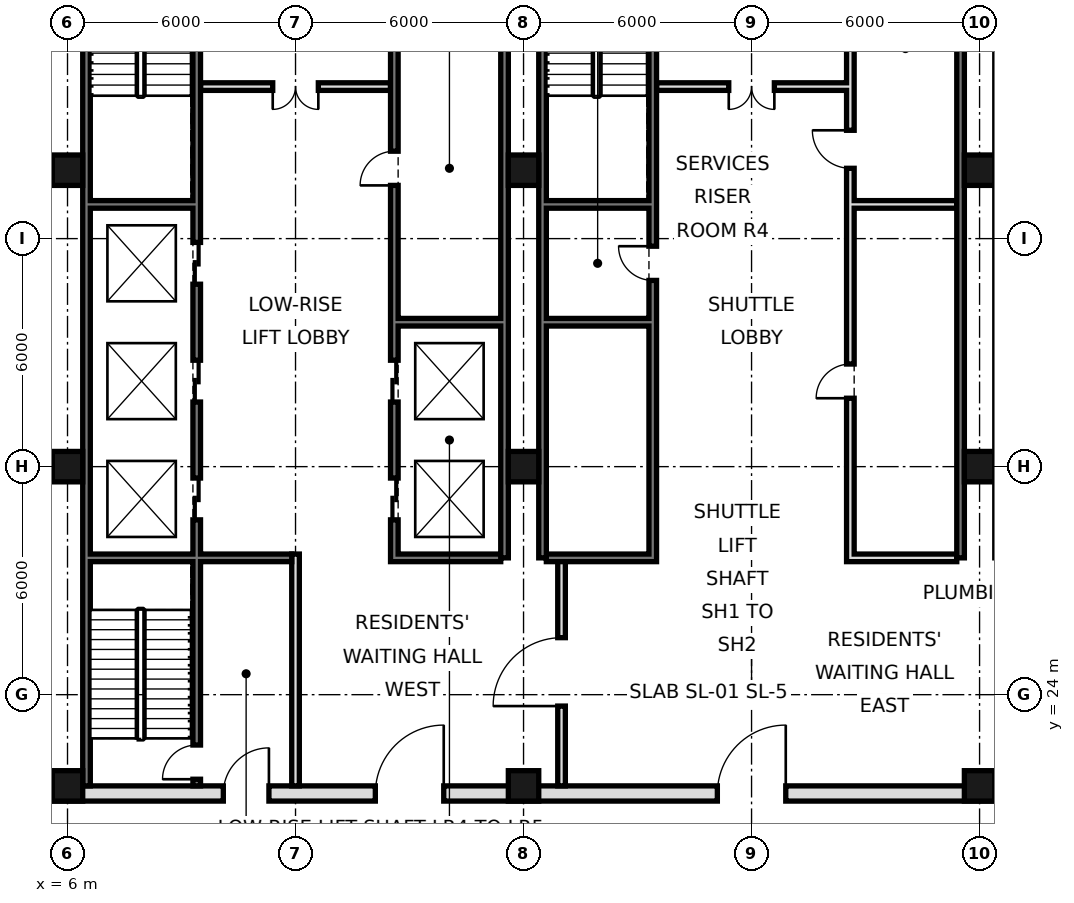
"""IFC4 building model, lengths in metres.
Left out: names, types, materials, properties, quantities, classifications, styles, units other than length and angle.
Written with IfcOpenShell. Run it as: python <this file> out.ifc"""

import sys

from ifc_helpers import new_model, si_unit, direction, frame, frame_2d, origin, origin_2d, place, context, subcontext, project, spatial, rectangle, hollow_rectangle, extrude, element, fill, save


model = new_model("IFC4")
c1 = context("Model", 3, precision=1e-05, world=origin(), true_north=direction((0.0, 1.0)))
c2 = subcontext(c1, "Body", "Model", "MODEL_VIEW")
j1 = project(units=[si_unit("LENGTHUNIT", "METRE"), si_unit("PLANEANGLEUNIT", "RADIAN")], contexts=[c1])
p1 = place(None, origin())
s1 = spatial("IfcSite", under=j1, at=p1, CompositionType="ELEMENT")
p2 = place(p1, origin())
s2 = spatial("IfcBuilding", under=s1, at=p2, CompositionType="ELEMENT")
p3 = place(p2, frame((0.0, 0.0, 34.8)))
s3 = spatial("IfcBuildingStorey", under=s2, at=p3, CompositionType="ELEMENT", Elevation=34.8)
for number, where, z_axis, x_axis in (
    (1, (6.0, 21.6, 0.0), (0.0, 0.0, 1.0), (1.0, 0.0, 0.0)),
    (2, (6.0, 30.0, 0.0), (0.0, 0.0, 1.0), (1.0, 0.0, 0.0)),
    (3, (6.0, 37.8, 0.0), (0.0, 0.0, 1.0), (1.0, 0.0, 0.0)),
    (4, (18.0, 21.6, 0.0), (0.0, 0.0, 1.0), (1.0, 0.0, 0.0)),
    (5, (18.0, 30.0, 0.0), (0.0, 0.0, 1.0), (1.0, 0.0, 0.0)),
    (6, (18.0, 37.8, 0.0), (0.0, 0.0, 1.0), (1.0, 0.0, 0.0)),
    (7, (30.0, 21.6, 0.0), (0.0, 0.0, 1.0), (1.0, 0.0, 0.0)),
    (8, (30.0, 30.0, 0.0), (0.0, 0.0, 1.0), (1.0, 0.0, 0.0)),
    (9, (30.0, 37.8, 0.0), (0.0, 0.0, 1.0), (1.0, 0.0, 0.0)),
):
    element("IfcColumn", number, at=place(p3, frame(where, z_axis=z_axis, x_axis=x_axis)), inside=s3, PredefinedType="COLUMN", context=c2, shape_type="SweptSolid", body=[
        extrude(hollow_rectangle(XDim=0.8, YDim=0.8, WallThickness=0.07, at=origin_2d()), origin(), (0.0, 0.0, 1.0), 4.8),
    ])
p4 = place(p3, frame((6.5, 21.6, 0.0), z_axis=(0.0, 0.0, 1.0), x_axis=(0.0, 1.0, 0.0)))
e10 = element("IfcWall", 10, at=p4, inside=s3, PredefinedType="SOLIDWALL", context=c2, shape_type="SweptSolid", body=[
    extrude(rectangle(XDim=23.5, YDim=0.2, at=frame_2d((11.75, 0.0))), origin(), (0.0, 0.0, 1.0), 4.4),
])
for number, where, z_axis, x_axis in (
    (11, (17.5, 27.6, 0.0), (0.0, 0.0, 1.0), (0.0, 1.0, 0.0)),
    (12, (18.5, 27.6, 0.0), (0.0, 0.0, 1.0), (0.0, 1.0, 0.0)),
    (13, (29.5, 27.6, 0.0), (0.0, 0.0, 1.0), (0.0, 1.0, 0.0)),
):
    element("IfcWall", number, at=place(p3, frame(where, z_axis=z_axis, x_axis=x_axis)), inside=s3, PredefinedType="SOLIDWALL", context=c2, shape_type="SweptSolid", body=[
        extrude(rectangle(XDim=17.5, YDim=0.2, at=frame_2d((8.75, 0.0))), origin(), (0.0, 0.0, 1.0), 4.4),
    ])
p5 = place(p3, frame((5.6, 21.4, 0.0), z_axis=(0.0, 0.0, 1.0), x_axis=(1.0, 0.0, 0.0)))
e14 = element("IfcWall", 14, at=p5, inside=s3, PredefinedType="SOLIDWALL", context=c2, shape_type="SweptSolid", body=[
    extrude(rectangle(XDim=36.8, YDim=0.4, at=frame_2d((18.4, 0.0))), origin(), (0.0, 0.0, 1.0), 4.4),
])
p6 = place(p5, frame((8.5, 0.0, 0.0)))
e15 = element("IfcOpeningElement", 15, at=p6, cuts=e14, PredefinedType="OPENING", context=c2, shape_type="SweptSolid", body=[
    extrude(rectangle(XDim=1.8, YDim=2.1, at=frame_2d((0.9, 1.05))), frame((0.0, 0.21, 0.0), z_axis=(0.0, -1.0, 0.0), x_axis=(1.0, 0.0, 0.0)), (0.0, 0.0, 1.0), 0.42),
])
p7 = place(p5, frame((17.5, 0.0, 0.0)))
e16 = element("IfcOpeningElement", 16, at=p7, cuts=e14, PredefinedType="OPENING", context=c2, shape_type="SweptSolid", body=[
    extrude(rectangle(XDim=1.8, YDim=2.1, at=frame_2d((0.9, 1.05))), frame((0.0, 0.21, 0.0), z_axis=(0.0, -1.0, 0.0), x_axis=(1.0, 0.0, 0.0)), (0.0, 0.0, 1.0), 0.42),
])
p8 = place(p5, frame((26.5, 0.0, 0.0)))
e17 = element("IfcOpeningElement", 17, at=p8, cuts=e14, PredefinedType="OPENING", context=c2, shape_type="SweptSolid", body=[
    extrude(rectangle(XDim=1.8, YDim=2.1, at=frame_2d((0.9, 1.05))), frame((0.0, 0.21, 0.0), z_axis=(0.0, -1.0, 0.0), x_axis=(1.0, 0.0, 0.0)), (0.0, 0.0, 1.0), 0.42),
])
p9 = place(p5, frame((4.5, 0.0, 0.0)))
e18 = element("IfcOpeningElement", 18, at=p9, cuts=e14, PredefinedType="OPENING", context=c2, shape_type="SweptSolid", body=[
    extrude(rectangle(XDim=1.2, YDim=2.1, at=frame_2d((0.6, 1.05))), frame((0.0, 0.21, 0.0), z_axis=(0.0, -1.0, 0.0), x_axis=(1.0, 0.0, 0.0)), (0.0, 0.0, 1.0), 0.42),
])
p10 = place(p5, frame((31.1, 0.0, 0.0)))
e19 = element("IfcOpeningElement", 19, at=p10, cuts=e14, PredefinedType="OPENING", context=c2, shape_type="SweptSolid", body=[
    extrude(rectangle(XDim=1.2, YDim=2.1, at=frame_2d((0.6, 1.05))), frame((0.0, 0.21, 0.0), z_axis=(0.0, -1.0, 0.0), x_axis=(1.0, 0.0, 0.0)), (0.0, 0.0, 1.0), 0.42),
])
p11 = place(p3, frame((19.0, 21.6, 0.0), z_axis=(0.0, 0.0, 1.0), x_axis=(0.0, 1.0, 0.0)))
e20 = element("IfcWall", 20, at=p11, inside=s3, PredefinedType="PARTITIONING", context=c2, shape_type="SweptSolid", body=[
    extrude(rectangle(XDim=6.0, YDim=0.2, at=frame_2d((3.0, 0.0))), origin(), (0.0, 0.0, 1.0), 4.4),
])
p12 = place(p11, frame((2.1, 0.0, 0.0)))
e21 = element("IfcOpeningElement", 21, at=p12, cuts=e20, PredefinedType="OPENING", context=c2, shape_type="SweptSolid", body=[
    extrude(rectangle(XDim=1.8, YDim=2.1, at=frame_2d((0.9, 1.05))), frame((0.0, 0.11, 0.0), z_axis=(0.0, -1.0, 0.0), x_axis=(1.0, 0.0, 0.0)), (0.0, 0.0, 1.0), 0.22),
])
p13 = place(p3, frame((12.0, 21.6, 0.0), z_axis=(0.0, 0.0, 1.0), x_axis=(0.0, 1.0, 0.0)))
e22 = element("IfcWall", 22, at=p13, inside=s3, PredefinedType="PARTITIONING", context=c2, shape_type="SweptSolid", body=[
    extrude(rectangle(XDim=6.1, YDim=0.2, at=frame_2d((3.05, 0.0))), origin(), (0.0, 0.0, 1.0), 4.4),
])
p14 = place(p3, frame((14.6, 27.5, 0.0), z_axis=(0.0, 0.0, 1.0), x_axis=(0.0, 1.0, 0.0)))
e23 = element("IfcWall", 23, at=p14, inside=s3, PredefinedType="SOLIDWALL", context=c2, shape_type="SweptSolid", body=[
    extrude(rectangle(XDim=17.5, YDim=0.2, at=frame_2d((8.75, 0.0))), origin(), (0.0, 0.0, 1.0), 4.4),
])
p15 = place(p14, frame((1.1, 0.0, 0.0)))
e24 = element("IfcOpeningElement", 24, at=p15, cuts=e23, PredefinedType="OPENING", context=c2, shape_type="SweptSolid", body=[
    extrude(rectangle(XDim=1.1, YDim=2.1, at=frame_2d((0.55, 1.05))), frame((0.0, 0.11, 0.0), z_axis=(0.0, -1.0, 0.0), x_axis=(1.0, 0.0, 0.0)), (0.0, 0.0, 1.0), 0.22),
])
p16 = place(p14, frame((4.2, 0.0, 0.0)))
e25 = element("IfcOpeningElement", 25, at=p16, cuts=e23, PredefinedType="OPENING", context=c2, shape_type="SweptSolid", body=[
    extrude(rectangle(XDim=1.1, YDim=2.1, at=frame_2d((0.55, 1.05))), frame((0.0, 0.11, 0.0), z_axis=(0.0, -1.0, 0.0), x_axis=(1.0, 0.0, 0.0)), (0.0, 0.0, 1.0), 0.22),
])
p17 = place(p14, frame((15.4, 0.0, 0.0)))
e26 = element("IfcOpeningElement", 26, at=p17, cuts=e23, PredefinedType="OPENING", context=c2, shape_type="SweptSolid", body=[
    extrude(rectangle(XDim=1.1, YDim=2.1, at=frame_2d((0.55, 1.05))), frame((0.0, 0.11, 0.0), z_axis=(0.0, -1.0, 0.0), x_axis=(1.0, 0.0, 0.0)), (0.0, 0.0, 1.0), 0.22),
])
p18 = place(p14, frame((9.9, 0.0, 0.0)))
e27 = element("IfcOpeningElement", 27, at=p18, cuts=e23, PredefinedType="OPENING", context=c2, shape_type="SweptSolid", body=[
    extrude(rectangle(XDim=0.9, YDim=2.1, at=frame_2d((0.45, 1.05))), frame((0.0, 0.11, 0.0), z_axis=(0.0, -1.0, 0.0), x_axis=(1.0, 0.0, 0.0)), (0.0, 0.0, 1.0), 0.22),
])
p19 = place(p3, frame((21.4, 27.5, 0.0), z_axis=(0.0, 0.0, 1.0), x_axis=(0.0, 1.0, 0.0)))
e28 = element("IfcWall", 28, at=p19, inside=s3, PredefinedType="SOLIDWALL", context=c2, shape_type="SweptSolid", body=[
    extrude(rectangle(XDim=17.5, YDim=0.2, at=frame_2d((8.75, 0.0))), origin(), (0.0, 0.0, 1.0), 4.4),
])
p20 = place(p19, frame((16.2, 0.0, 0.0)))
e29 = element("IfcOpeningElement", 29, at=p20, cuts=e28, PredefinedType="OPENING", context=c2, shape_type="SweptSolid", body=[
    extrude(rectangle(XDim=1.0, YDim=2.1, at=frame_2d((0.5, 1.05))), frame((0.0, 0.11, 0.0), z_axis=(0.0, -1.0, 0.0), x_axis=(1.0, 0.0, 0.0)), (0.0, 0.0, 1.0), 0.22),
])
p21 = place(p19, frame((7.4, 0.0, 0.0)))
e30 = element("IfcOpeningElement", 30, at=p21, cuts=e28, PredefinedType="OPENING", context=c2, shape_type="SweptSolid", body=[
    extrude(rectangle(XDim=0.9, YDim=2.1, at=frame_2d((0.45, 1.05))), frame((0.0, 0.11, 0.0), z_axis=(0.0, -1.0, 0.0), x_axis=(1.0, 0.0, 0.0)), (0.0, 0.0, 1.0), 0.22),
])
p22 = place(p3, frame((26.6, 27.5, 0.0), z_axis=(0.0, 0.0, 1.0), x_axis=(0.0, 1.0, 0.0)))
e31 = element("IfcWall", 31, at=p22, inside=s3, PredefinedType="SOLIDWALL", context=c2, shape_type="SweptSolid", body=[
    extrude(rectangle(XDim=17.5, YDim=0.2, at=frame_2d((8.75, 0.0))), origin(), (0.0, 0.0, 1.0), 4.4),
])
p23 = place(p22, frame((4.3, 0.0, 0.0)))
e32 = element("IfcOpeningElement", 32, at=p23, cuts=e31, PredefinedType="OPENING", context=c2, shape_type="SweptSolid", body=[
    extrude(rectangle(XDim=0.9, YDim=2.1, at=frame_2d((0.45, 1.05))), frame((0.0, 0.11, 0.0), z_axis=(0.0, -1.0, 0.0), x_axis=(1.0, 0.0, 0.0)), (0.0, 0.0, 1.0), 0.22),
])
p24 = place(p22, frame((10.35, 0.0, 0.0)))
e33 = element("IfcOpeningElement", 33, at=p24, cuts=e31, PredefinedType="OPENING", context=c2, shape_type="SweptSolid", body=[
    extrude(rectangle(XDim=1.0, YDim=2.1, at=frame_2d((0.5, 1.05))), frame((0.0, 0.11, 0.0), z_axis=(0.0, -1.0, 0.0), x_axis=(1.0, 0.0, 0.0)), (0.0, 0.0, 1.0), 0.22),
])
p25 = place(p3, frame((9.4, 21.6, 0.0), z_axis=(0.0, 0.0, 1.0), x_axis=(0.0, 1.0, 0.0)))
e34 = element("IfcWall", 34, at=p25, inside=s3, PredefinedType="SOLIDWALL", context=c2, shape_type="SweptSolid", body=[
    extrude(rectangle(XDim=23.4, YDim=0.2, at=frame_2d((11.7, 0.0))), origin(), (0.0, 0.0, 1.0), 4.4),
])
p26 = place(p25, frame((7.0, 0.0, 0.0)))
e35 = element("IfcOpeningElement", 35, at=p26, cuts=e34, PredefinedType="OPENING", context=c2, shape_type="SweptSolid", body=[
    extrude(rectangle(XDim=1.1, YDim=2.1, at=frame_2d((0.55, 1.05))), frame((0.0, 0.11, 0.0), z_axis=(0.0, -1.0, 0.0), x_axis=(1.0, 0.0, 0.0)), (0.0, 0.0, 1.0), 0.22),
])
p27 = place(p25, frame((10.1, 0.0, 0.0)))
e36 = element("IfcOpeningElement", 36, at=p27, cuts=e34, PredefinedType="OPENING", context=c2, shape_type="SweptSolid", body=[
    extrude(rectangle(XDim=1.1, YDim=2.1, at=frame_2d((0.55, 1.05))), frame((0.0, 0.11, 0.0), z_axis=(0.0, -1.0, 0.0), x_axis=(1.0, 0.0, 0.0)), (0.0, 0.0, 1.0), 0.22),
])
p28 = place(p25, frame((13.2, 0.0, 0.0)))
e37 = element("IfcOpeningElement", 37, at=p28, cuts=e34, PredefinedType="OPENING", context=c2, shape_type="SweptSolid", body=[
    extrude(rectangle(XDim=1.1, YDim=2.1, at=frame_2d((0.55, 1.05))), frame((0.0, 0.11, 0.0), z_axis=(0.0, -1.0, 0.0), x_axis=(1.0, 0.0, 0.0)), (0.0, 0.0, 1.0), 0.22),
])
p29 = place(p25, frame((22.1, 0.0, 0.0)))
e38 = element("IfcOpeningElement", 38, at=p29, cuts=e34, PredefinedType="OPENING", context=c2, shape_type="SweptSolid", body=[
    extrude(rectangle(XDim=1.0, YDim=2.1, at=frame_2d((0.5, 1.05))), frame((0.0, 0.11, 0.0), z_axis=(0.0, -1.0, 0.0), x_axis=(1.0, 0.0, 0.0)), (0.0, 0.0, 1.0), 0.22),
])
p30 = place(p25, frame((0.175, 0.0, 0.0)))
e39 = element("IfcOpeningElement", 39, at=p30, cuts=e34, PredefinedType="OPENING", context=c2, shape_type="SweptSolid", body=[
    extrude(rectangle(XDim=0.9, YDim=2.1, at=frame_2d((0.45, 1.05))), frame((0.0, 0.11, 0.0), z_axis=(0.0, -1.0, 0.0), x_axis=(1.0, 0.0, 0.0)), (0.0, 0.0, 1.0), 0.22),
])
for number, where, z_axis, x_axis in (
    (40, (14.7, 27.6, 0.0), (0.0, 0.0, 1.0), (1.0, 0.0, 0.0)),
    (41, (18.6, 27.6, 0.0), (0.0, 0.0, 1.0), (1.0, 0.0, 0.0)),
    (42, (26.7, 27.6, 0.0), (0.0, 0.0, 1.0), (1.0, 0.0, 0.0)),
):
    element("IfcWall", number, at=place(p3, frame(where, z_axis=z_axis, x_axis=x_axis)), inside=s3, PredefinedType="SOLIDWALL", context=c2, shape_type="SweptSolid", body=[
        extrude(rectangle(XDim=2.7, YDim=0.2, at=frame_2d((1.35, 0.0))), origin(), (0.0, 0.0, 1.0), 4.4),
    ])
p31 = place(p3, frame((6.6, 27.6, 0.0), z_axis=(0.0, 0.0, 1.0), x_axis=(1.0, 0.0, 0.0)))
e43 = element("IfcWall", 43, at=p31, inside=s3, PredefinedType="SOLIDWALL", context=c2, shape_type="SweptSolid", body=[
    extrude(rectangle(XDim=5.3, YDim=0.2, at=frame_2d((2.65, 0.0))), origin(), (0.0, 0.0, 1.0), 4.4),
])
for number, where, z_axis, x_axis in (
    (44, (14.7, 33.8, 0.0), (0.0, 0.0, 1.0), (1.0, 0.0, 0.0)),
    (45, (18.6, 33.8, 0.0), (0.0, 0.0, 1.0), (1.0, 0.0, 0.0)),
    (46, (18.6, 36.9, 0.0), (0.0, 0.0, 1.0), (1.0, 0.0, 0.0)),
    (47, (26.7, 36.9, 0.0), (0.0, 0.0, 1.0), (1.0, 0.0, 0.0)),
    (48, (6.6, 36.9, 0.0), (0.0, 0.0, 1.0), (1.0, 0.0, 0.0)),
):
    element("IfcWall", number, at=place(p3, frame(where, z_axis=z_axis, x_axis=x_axis)), inside=s3, PredefinedType="SOLIDWALL", context=c2, shape_type="SweptSolid", body=[
        extrude(rectangle(XDim=2.7, YDim=0.2, at=frame_2d((1.35, 0.0))), origin(), (0.0, 0.0, 1.0), 4.4),
    ])
p32 = place(p3, frame((21.5, 40.0, 0.0), z_axis=(0.0, 0.0, 1.0), x_axis=(1.0, 0.0, 0.0)))
e49 = element("IfcWall", 49, at=p32, inside=s3, PredefinedType="PARTITIONING", context=c2, shape_type="SweptSolid", body=[
    extrude(rectangle(XDim=5.0, YDim=0.2, at=frame_2d((2.5, 0.0))), origin(), (0.0, 0.0, 1.0), 4.4),
])
p33 = place(p32, frame((1.9, 0.0, 0.0)))
e50 = element("IfcOpeningElement", 50, at=p33, cuts=e49, PredefinedType="OPENING", context=c2, shape_type="SweptSolid", body=[
    extrude(rectangle(XDim=1.2, YDim=2.1, at=frame_2d((0.6, 1.05))), frame((0.0, 0.11, 0.0), z_axis=(0.0, -1.0, 0.0), x_axis=(1.0, 0.0, 0.0)), (0.0, 0.0, 1.0), 0.22),
])
p34 = place(p3, frame((9.5, 40.0, 0.0), z_axis=(0.0, 0.0, 1.0), x_axis=(1.0, 0.0, 0.0)))
e51 = element("IfcWall", 51, at=p34, inside=s3, PredefinedType="PARTITIONING", context=c2, shape_type="SweptSolid", body=[
    extrude(rectangle(XDim=5.0, YDim=0.2, at=frame_2d((2.5, 0.0))), origin(), (0.0, 0.0, 1.0), 4.4),
])
p35 = place(p34, frame((1.9, 0.0, 0.0)))
e52 = element("IfcOpeningElement", 52, at=p35, cuts=e51, PredefinedType="OPENING", context=c2, shape_type="SweptSolid", body=[
    extrude(rectangle(XDim=1.2, YDim=2.1, at=frame_2d((0.6, 1.05))), frame((0.0, 0.11, 0.0), z_axis=(0.0, -1.0, 0.0), x_axis=(1.0, 0.0, 0.0)), (0.0, 0.0, 1.0), 0.22),
])
p36 = place(p6, frame((1.8, 0.0, 0.0), z_axis=(0.0, 0.0, 1.0), x_axis=(-1.0, 0.0, 0.0)))
e53 = element("IfcDoor", 53, at=p36, inside=s3, OperationType="SINGLE_SWING_LEFT", PredefinedType="DOOR", context=c2, shape_type="SweptSolid", body=[
    extrude(rectangle(XDim=1.8, YDim=2.1, at=frame_2d((0.9, 1.05))), frame((0.0, 0.025, 0.0), z_axis=(0.0, -1.0, 0.0), x_axis=(1.0, 0.0, 0.0)), (0.0, 0.0, 1.0), 0.05),
])
fill(e15, e53)
p37 = place(p12, origin())
e54 = element("IfcDoor", 54, at=p37, inside=s3, OperationType="SINGLE_SWING_LEFT", PredefinedType="DOOR", context=c2, shape_type="SweptSolid", body=[
    extrude(rectangle(XDim=1.8, YDim=2.1, at=frame_2d((0.9, 1.05))), frame((0.0, 0.025, 0.0), z_axis=(0.0, -1.0, 0.0), x_axis=(1.0, 0.0, 0.0)), (0.0, 0.0, 1.0), 0.05),
])
fill(e21, e54)
p38 = place(p7, frame((1.8, 0.0, 0.0), z_axis=(0.0, 0.0, 1.0), x_axis=(-1.0, 0.0, 0.0)))
e55 = element("IfcDoor", 55, at=p38, inside=s3, OperationType="SINGLE_SWING_LEFT", PredefinedType="DOOR", context=c2, shape_type="SweptSolid", body=[
    extrude(rectangle(XDim=1.8, YDim=2.1, at=frame_2d((0.9, 1.05))), frame((0.0, 0.025, 0.0), z_axis=(0.0, -1.0, 0.0), x_axis=(1.0, 0.0, 0.0)), (0.0, 0.0, 1.0), 0.05),
])
fill(e16, e55)
p39 = place(p9, frame((1.2, 0.0, 0.0), z_axis=(0.0, 0.0, 1.0), x_axis=(-1.0, 0.0, 0.0)))
e56 = element("IfcDoor", 56, at=p39, inside=s3, OperationType="SINGLE_SWING_LEFT", PredefinedType="DOOR", context=c2, shape_type="SweptSolid", body=[
    extrude(rectangle(XDim=1.2, YDim=2.1, at=frame_2d((0.6, 1.05))), frame((0.0, 0.025, 0.0), z_axis=(0.0, -1.0, 0.0), x_axis=(1.0, 0.0, 0.0)), (0.0, 0.0, 1.0), 0.05),
])
fill(e18, e56)
p40 = place(p35, frame((1.2, 0.0, 0.0), z_axis=(0.0, 0.0, 1.0), x_axis=(-1.0, 0.0, 0.0)))
e57 = element("IfcDoor", 57, at=p40, inside=s3, OperationType="DOUBLE_DOOR_SINGLE_SWING", PredefinedType="DOOR", context=c2, shape_type="SweptSolid", body=[
    extrude(rectangle(XDim=1.2, YDim=2.1, at=frame_2d((0.6, 1.05))), frame((0.0, 0.025, 0.0), z_axis=(0.0, -1.0, 0.0), x_axis=(1.0, 0.0, 0.0)), (0.0, 0.0, 1.0), 0.05),
])
fill(e52, e57)
p41 = place(p33, frame((1.2, 0.0, 0.0), z_axis=(0.0, 0.0, 1.0), x_axis=(-1.0, 0.0, 0.0)))
e58 = element("IfcDoor", 58, at=p41, inside=s3, OperationType="DOUBLE_DOOR_SINGLE_SWING", PredefinedType="DOOR", context=c2, shape_type="SweptSolid", body=[
    extrude(rectangle(XDim=1.2, YDim=2.1, at=frame_2d((0.6, 1.05))), frame((0.0, 0.025, 0.0), z_axis=(0.0, -1.0, 0.0), x_axis=(1.0, 0.0, 0.0)), (0.0, 0.0, 1.0), 0.05),
])
fill(e50, e58)
p42 = place(p15, origin())
e59 = element("IfcDoor", 59, at=p42, inside=s3, OperationType="DOUBLE_DOOR_SLIDING", PredefinedType="DOOR", context=c2, shape_type="SweptSolid", body=[
    extrude(rectangle(XDim=1.1, YDim=2.1, at=frame_2d((0.55, 1.05))), frame((0.0, 0.025, 0.0), z_axis=(0.0, -1.0, 0.0), x_axis=(1.0, 0.0, 0.0)), (0.0, 0.0, 1.0), 0.05),
])
fill(e24, e59)
p43 = place(p16, origin())
e60 = element("IfcDoor", 60, at=p43, inside=s3, OperationType="DOUBLE_DOOR_SLIDING", PredefinedType="DOOR", context=c2, shape_type="SweptSolid", body=[
    extrude(rectangle(XDim=1.1, YDim=2.1, at=frame_2d((0.55, 1.05))), frame((0.0, 0.025, 0.0), z_axis=(0.0, -1.0, 0.0), x_axis=(1.0, 0.0, 0.0)), (0.0, 0.0, 1.0), 0.05),
])
fill(e25, e60)
p44 = place(p26, origin())
e61 = element("IfcDoor", 61, at=p44, inside=s3, OperationType="DOUBLE_DOOR_SLIDING", PredefinedType="DOOR", context=c2, shape_type="SweptSolid", body=[
    extrude(rectangle(XDim=1.1, YDim=2.1, at=frame_2d((0.55, 1.05))), frame((0.0, 0.025, 0.0), z_axis=(0.0, -1.0, 0.0), x_axis=(1.0, 0.0, 0.0)), (0.0, 0.0, 1.0), 0.05),
])
fill(e35, e61)
p45 = place(p27, origin())
e62 = element("IfcDoor", 62, at=p45, inside=s3, OperationType="DOUBLE_DOOR_SLIDING", PredefinedType="DOOR", context=c2, shape_type="SweptSolid", body=[
    extrude(rectangle(XDim=1.1, YDim=2.1, at=frame_2d((0.55, 1.05))), frame((0.0, 0.025, 0.0), z_axis=(0.0, -1.0, 0.0), x_axis=(1.0, 0.0, 0.0)), (0.0, 0.0, 1.0), 0.05),
])
fill(e36, e62)
p46 = place(p28, origin())
e63 = element("IfcDoor", 63, at=p46, inside=s3, OperationType="DOUBLE_DOOR_SLIDING", PredefinedType="DOOR", context=c2, shape_type="SweptSolid", body=[
    extrude(rectangle(XDim=1.1, YDim=2.1, at=frame_2d((0.55, 1.05))), frame((0.0, 0.025, 0.0), z_axis=(0.0, -1.0, 0.0), x_axis=(1.0, 0.0, 0.0)), (0.0, 0.0, 1.0), 0.05),
])
fill(e37, e63)
p47 = place(p30, origin())
e64 = element("IfcDoor", 64, at=p47, inside=s3, OperationType="SINGLE_SWING_LEFT", PredefinedType="DOOR", context=c2, shape_type="SweptSolid", body=[
    extrude(rectangle(XDim=0.9, YDim=2.1, at=frame_2d((0.45, 1.05))), frame((0.0, 0.025, 0.0), z_axis=(0.0, -1.0, 0.0), x_axis=(1.0, 0.0, 0.0)), (0.0, 0.0, 1.0), 0.05),
])
fill(e39, e64)
p48 = place(p18, origin())
e65 = element("IfcDoor", 65, at=p48, inside=s3, OperationType="SINGLE_SWING_LEFT", PredefinedType="DOOR", context=c2, shape_type="SweptSolid", body=[
    extrude(rectangle(XDim=0.9, YDim=2.1, at=frame_2d((0.45, 1.05))), frame((0.0, 0.025, 0.0), z_axis=(0.0, -1.0, 0.0), x_axis=(1.0, 0.0, 0.0)), (0.0, 0.0, 1.0), 0.05),
])
fill(e27, e65)
p49 = place(p21, frame((0.9, 0.0, 0.0), z_axis=(0.0, 0.0, 1.0), x_axis=(-1.0, 0.0, 0.0)))
e66 = element("IfcDoor", 66, at=p49, inside=s3, OperationType="SINGLE_SWING_LEFT", PredefinedType="DOOR", context=c2, shape_type="SweptSolid", body=[
    extrude(rectangle(XDim=0.9, YDim=2.1, at=frame_2d((0.45, 1.05))), frame((0.0, 0.025, 0.0), z_axis=(0.0, -1.0, 0.0), x_axis=(1.0, 0.0, 0.0)), (0.0, 0.0, 1.0), 0.05),
])
fill(e30, e66)
p50 = place(p23, origin())
e67 = element("IfcDoor", 67, at=p50, inside=s3, OperationType="SINGLE_SWING_LEFT", PredefinedType="DOOR", context=c2, shape_type="SweptSolid", body=[
    extrude(rectangle(XDim=0.9, YDim=2.1, at=frame_2d((0.45, 1.05))), frame((0.0, 0.025, 0.0), z_axis=(0.0, -1.0, 0.0), x_axis=(1.0, 0.0, 0.0)), (0.0, 0.0, 1.0), 0.05),
])
fill(e32, e67)
p51 = place(p24, frame((1.0, 0.0, 0.0), z_axis=(0.0, 0.0, 1.0), x_axis=(-1.0, 0.0, 0.0)))
e68 = element("IfcDoor", 68, at=p51, inside=s3, OperationType="SINGLE_SWING_LEFT", PredefinedType="DOOR", context=c2, shape_type="SweptSolid", body=[
    extrude(rectangle(XDim=1.0, YDim=2.1, at=frame_2d((0.5, 1.05))), frame((0.0, 0.025, 0.0), z_axis=(0.0, -1.0, 0.0), x_axis=(1.0, 0.0, 0.0)), (0.0, 0.0, 1.0), 0.05),
])
fill(e33, e68)
save(model, sys.argv[1])
